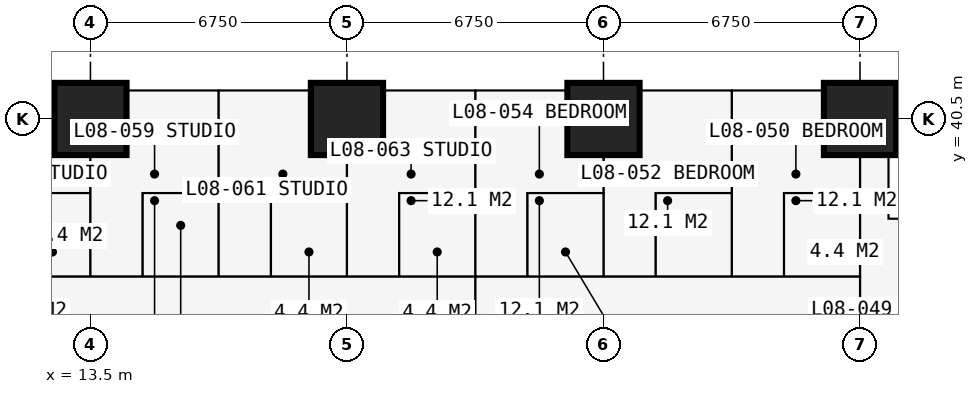
"""IFC4 building model, lengths in metres.
Left out: names, types, materials, properties, quantities, classifications, styles, units other than length and angle.
Written with IfcOpenShell. Run it as: python <this file> out.ifc"""

import sys

from ifc_helpers import new_model, si_unit, direction, frame, frame_2d, origin, origin_2d, place, context, subcontext, project, spatial, rectangle, extrude, element, fill, save


model = new_model("IFC4")
c1 = context("Model", 3, precision=1e-05, world=origin(), true_north=direction((0.0, 1.0)))
c2 = subcontext(c1, "Body", "Model", "MODEL_VIEW")
j1 = project(units=[si_unit("LENGTHUNIT", "METRE"), si_unit("PLANEANGLEUNIT", "RADIAN")], contexts=[c1])
p1 = place(None, origin())
s1 = spatial("IfcSite", under=j1, at=p1, CompositionType="ELEMENT")
p2 = place(p1, origin())
s2 = spatial("IfcBuilding", under=s1, at=p2, CompositionType="ELEMENT")
p3 = place(p2, frame((0.0, 0.0, 32.4)))
s3 = spatial("IfcBuildingStorey", under=s2, at=p3, CompositionType="ELEMENT", Elevation=32.4)
for number, where, z_axis, x_axis in (
    (1, (13.5, 40.5, 0.0), (0.0, 0.0, 1.0), (1.0, 0.0, 0.0)),
    (2, (20.25, 40.5, 0.0), (0.0, 0.0, 1.0), (1.0, 0.0, 0.0)),
    (3, (27.0, 40.5, 0.0), (0.0, 0.0, 1.0), (1.0, 0.0, 0.0)),
    (4, (33.75, 40.5, 0.0), (0.0, 0.0, 1.0), (1.0, 0.0, 0.0)),
):
    element("IfcColumn", number, at=place(p3, frame(where, z_axis=z_axis, x_axis=x_axis)), inside=s3, PredefinedType="COLUMN", context=c2, shape_type="SweptSolid", body=[
        extrude(rectangle(XDim=1.9, YDim=1.9, at=origin_2d()), origin(), (0.0, 0.0, 1.0), 3.6),
    ])
p4 = place(p3, frame((37.875, 37.875, 0.0), z_axis=(0.0, 0.0, 1.0), x_axis=(-1.0, 0.0, 0.0)))
e5 = element("IfcWall", 5, at=p4, inside=s3, PredefinedType="SOLIDWALL", context=c2, shape_type="SweptSolid", body=[
    extrude(rectangle(XDim=3.375, YDim=0.3, at=frame_2d((1.688, 0.0))), origin(), (0.0, 0.0, 1.0), 3.375),
])
p5 = place(p4, frame((0.788, 0.0, 0.6)))
e6 = element("IfcOpeningElement", 6, at=p5, cuts=e5, PredefinedType="OPENING", context=c2, shape_type="SweptSolid", body=[
    extrude(rectangle(XDim=1.8, YDim=2.1, at=frame_2d((0.9, 1.05))), frame((0.0, 0.16, 0.0), z_axis=(0.0, -1.0, 0.0), x_axis=(1.0, 0.0, 0.0)), (0.0, 0.0, 1.0), 0.32),
])
p6 = place(p3, frame((34.5, 37.875, 0.0), z_axis=(0.0, 0.0, 1.0), x_axis=(0.0, 1.0, 0.0)))
e7 = element("IfcWall", 7, at=p6, inside=s3, PredefinedType="SOLIDWALL", context=c2, shape_type="SweptSolid", body=[
    extrude(rectangle(XDim=3.375, YDim=0.3, at=frame_2d((1.688, 0.0))), origin(), (0.0, 0.0, 1.0), 3.375),
])
p7 = place(p6, frame((0.317, 0.0, 0.9)))
e8 = element("IfcOpeningElement", 8, at=p7, cuts=e7, PredefinedType="OPENING", context=c2, shape_type="SweptSolid", body=[
    extrude(rectangle(XDim=1.2, YDim=1.8, at=frame_2d((0.6, 0.9))), frame((0.0, 0.16, 0.0), z_axis=(0.0, -1.0, 0.0), x_axis=(1.0, 0.0, 0.0)), (0.0, 0.0, 1.0), 0.32),
])
p8 = place(p3, frame((13.5, 41.25, 0.0), z_axis=(0.0, 0.0, 1.0), x_axis=(1.0, 0.0, 0.0)))
e9 = element("IfcWall", 9, at=p8, inside=s3, PredefinedType="SOLIDWALL", context=c2, shape_type="SweptSolid", body=[
    extrude(rectangle(XDim=6.75, YDim=0.15, at=frame_2d((3.375, 0.0))), origin(), (0.0, 0.0, 1.0), 3.375),
])
p9 = place(p8, frame((0.996, 0.0, 0.0)))
e10 = element("IfcOpeningElement", 10, at=p9, cuts=e9, PredefinedType="OPENING", context=c2, shape_type="SweptSolid", body=[
    extrude(rectangle(XDim=1.0, YDim=2.2, at=frame_2d((0.5, 1.1))), frame((0.0, 0.085, 0.0), z_axis=(0.0, -1.0, 0.0), x_axis=(1.0, 0.0, 0.0)), (0.0, 0.0, 1.0), 0.17),
])
p10 = place(p8, frame((2.042, 0.0, 0.9)))
e11 = element("IfcOpeningElement", 11, at=p10, cuts=e9, PredefinedType="OPENING", context=c2, shape_type="SweptSolid", body=[
    extrude(rectangle(XDim=1.2, YDim=1.8, at=frame_2d((0.6, 0.9))), frame((0.0, 0.085, 0.0), z_axis=(0.0, -1.0, 0.0), x_axis=(1.0, 0.0, 0.0)), (0.0, 0.0, 1.0), 0.17),
])
p11 = place(p8, frame((4.754, 0.0, 0.0)))
e12 = element("IfcOpeningElement", 12, at=p11, cuts=e9, PredefinedType="OPENING", context=c2, shape_type="SweptSolid", body=[
    extrude(rectangle(XDim=1.0, YDim=2.2, at=frame_2d((0.5, 1.1))), frame((0.0, 0.085, 0.0), z_axis=(0.0, -1.0, 0.0), x_axis=(1.0, 0.0, 0.0)), (0.0, 0.0, 1.0), 0.17),
])
p12 = place(p8, frame((3.508, 0.0, 0.9)))
e13 = element("IfcOpeningElement", 13, at=p12, cuts=e9, PredefinedType="OPENING", context=c2, shape_type="SweptSolid", body=[
    extrude(rectangle(XDim=1.2, YDim=1.8, at=frame_2d((0.6, 0.9))), frame((0.0, 0.085, 0.0), z_axis=(0.0, -1.0, 0.0), x_axis=(1.0, 0.0, 0.0)), (0.0, 0.0, 1.0), 0.17),
])
p13 = place(p3, frame((16.875, 41.35, 0.0), z_axis=(0.0, 0.0, 1.0), x_axis=(0.0, 1.0, 0.0)))
e14 = element("IfcWall", 14, at=p13, inside=s3, PredefinedType="USERDEFINED", context=c2, shape_type="SweptSolid", body=[
    extrude(rectangle(XDim=2.2, YDim=1.0, at=frame_2d((1.1, 0.0))), origin(), (0.0, 0.0, 1.0), 0.9),
])
p14 = place(p3, frame((10.125, 36.35, 0.0), z_axis=(0.0, 0.0, 1.0), x_axis=(1.0, 0.0, 0.0)))
e15 = element("IfcWall", 15, at=p14, inside=s3, PredefinedType="PARTITIONING", context=c2, shape_type="SweptSolid", body=[
    extrude(rectangle(XDim=23.625, YDim=0.1, at=frame_2d((11.812, 0.0))), origin(), (0.0, 0.0, 1.0), 3.375),
])
p15 = place(p14, frame((20.5, 0.0, 0.0)))
e16 = element("IfcOpeningElement", 16, at=p15, cuts=e15, PredefinedType="OPENING", context=c2, shape_type="SweptSolid", body=[
    extrude(rectangle(XDim=0.95, YDim=2.2, at=frame_2d((0.475, 1.1))), frame((0.0, 0.06, 0.0), z_axis=(0.0, -1.0, 0.0), x_axis=(1.0, 0.0, 0.0)), (0.0, 0.0, 1.0), 0.12),
])
p16 = place(p14, frame((17.125, 0.0, 0.0)))
e17 = element("IfcOpeningElement", 17, at=p16, cuts=e15, PredefinedType="OPENING", context=c2, shape_type="SweptSolid", body=[
    extrude(rectangle(XDim=0.95, YDim=2.2, at=frame_2d((0.475, 1.1))), frame((0.0, 0.06, 0.0), z_axis=(0.0, -1.0, 0.0), x_axis=(1.0, 0.0, 0.0)), (0.0, 0.0, 1.0), 0.12),
])
p17 = place(p14, frame((13.7, 0.0, 0.0)))
e18 = element("IfcOpeningElement", 18, at=p17, cuts=e15, PredefinedType="OPENING", context=c2, shape_type="SweptSolid", body=[
    extrude(rectangle(XDim=0.95, YDim=2.2, at=frame_2d((0.475, 1.1))), frame((0.0, 0.06, 0.0), z_axis=(0.0, -1.0, 0.0), x_axis=(1.0, 0.0, 0.0)), (0.0, 0.0, 1.0), 0.12),
])
p18 = place(p14, frame((0.2, 0.0, 0.0)))
e19 = element("IfcOpeningElement", 19, at=p18, cuts=e15, PredefinedType="OPENING", context=c2, shape_type="SweptSolid", body=[
    extrude(rectangle(XDim=0.95, YDim=2.2, at=frame_2d((0.475, 1.1))), frame((0.0, 0.06, 0.0), z_axis=(0.0, -1.0, 0.0), x_axis=(1.0, 0.0, 0.0)), (0.0, 0.0, 1.0), 0.12),
])
p19 = place(p14, frame((3.625, 0.0, 0.0)))
e20 = element("IfcOpeningElement", 20, at=p19, cuts=e15, PredefinedType="OPENING", context=c2, shape_type="SweptSolid", body=[
    extrude(rectangle(XDim=0.95, YDim=2.2, at=frame_2d((0.475, 1.1))), frame((0.0, 0.06, 0.0), z_axis=(0.0, -1.0, 0.0), x_axis=(1.0, 0.0, 0.0)), (0.0, 0.0, 1.0), 0.12),
])
p20 = place(p14, frame((7.0, 0.0, 0.0)))
e21 = element("IfcOpeningElement", 21, at=p20, cuts=e15, PredefinedType="OPENING", context=c2, shape_type="SweptSolid", body=[
    extrude(rectangle(XDim=0.95, YDim=2.2, at=frame_2d((0.475, 1.1))), frame((0.0, 0.06, 0.0), z_axis=(0.0, -1.0, 0.0), x_axis=(1.0, 0.0, 0.0)), (0.0, 0.0, 1.0), 0.12),
])
p21 = place(p14, frame((10.375, 0.0, 0.0)))
e22 = element("IfcOpeningElement", 22, at=p21, cuts=e15, PredefinedType="OPENING", context=c2, shape_type="SweptSolid", body=[
    extrude(rectangle(XDim=0.95, YDim=2.2, at=frame_2d((0.475, 1.1))), frame((0.0, 0.06, 0.0), z_axis=(0.0, -1.0, 0.0), x_axis=(1.0, 0.0, 0.0)), (0.0, 0.0, 1.0), 0.12),
])
p22 = place(p3, frame((11.5, 38.55, 0.0), z_axis=(0.0, 0.0, 1.0), x_axis=(1.0, 0.0, 0.0)))
e23 = element("IfcWall", 23, at=p22, inside=s3, PredefinedType="PARTITIONING", context=c2, shape_type="SweptSolid", body=[
    extrude(rectangle(XDim=2.0, YDim=0.1, at=frame_2d((1.0, 0.0))), origin(), (0.0, 0.0, 1.0), 3.375),
])
p23 = place(p3, frame((13.5, 36.35, 0.0), z_axis=(0.0, 0.0, 1.0), x_axis=(0.0, 1.0, 0.0)))
e24 = element("IfcWall", 24, at=p23, inside=s3, PredefinedType="PARTITIONING", context=c2, shape_type="SweptSolid", body=[
    extrude(rectangle(XDim=4.884, YDim=0.175, at=frame_2d((2.442, 0.0))), origin(), (0.0, 0.0, 1.0), 2.877),
])
p24 = place(p3, frame((14.875, 36.35, 0.0), z_axis=(0.0, 0.0, 1.0), x_axis=(0.0, 1.0, 0.0)))
e25 = element("IfcWall", 25, at=p24, inside=s3, PredefinedType="PARTITIONING", context=c2, shape_type="SweptSolid", body=[
    extrude(rectangle(XDim=2.2, YDim=0.1, at=frame_2d((1.1, 0.0))), origin(), (0.0, 0.0, 1.0), 3.375),
])
p25 = place(p24, frame((0.65, 0.0, 0.0)))
e26 = element("IfcOpeningElement", 26, at=p25, cuts=e25, PredefinedType="OPENING", context=c2, shape_type="SweptSolid", body=[
    extrude(rectangle(XDim=0.9, YDim=2.2, at=frame_2d((0.45, 1.1))), frame((0.0, 0.06, 0.0), z_axis=(0.0, -1.0, 0.0), x_axis=(1.0, 0.0, 0.0)), (0.0, 0.0, 1.0), 0.12),
])
p26 = place(p3, frame((14.875, 38.55, 0.0), z_axis=(0.0, 0.0, 1.0), x_axis=(1.0, 0.0, 0.0)))
e27 = element("IfcWall", 27, at=p26, inside=s3, PredefinedType="PARTITIONING", context=c2, shape_type="SweptSolid", body=[
    extrude(rectangle(XDim=2.0, YDim=0.1, at=frame_2d((1.0, 0.0))), origin(), (0.0, 0.0, 1.0), 3.375),
])
p27 = place(p3, frame((16.875, 36.35, 0.0), z_axis=(0.0, 0.0, 1.0), x_axis=(0.0, 1.0, 0.0)))
e28 = element("IfcWall", 28, at=p27, inside=s3, PredefinedType="PARTITIONING", context=c2, shape_type="SweptSolid", body=[
    extrude(rectangle(XDim=4.884, YDim=0.175, at=frame_2d((2.442, 0.0))), origin(), (0.0, 0.0, 1.0), 3.375),
])
p28 = place(p3, frame((18.25, 36.35, 0.0), z_axis=(0.0, 0.0, 1.0), x_axis=(0.0, 1.0, 0.0)))
e29 = element("IfcWall", 29, at=p28, inside=s3, PredefinedType="PARTITIONING", context=c2, shape_type="SweptSolid", body=[
    extrude(rectangle(XDim=2.2, YDim=0.1, at=frame_2d((1.1, 0.0))), origin(), (0.0, 0.0, 1.0), 3.375),
])
p29 = place(p28, frame((0.65, 0.0, 0.0)))
e30 = element("IfcOpeningElement", 30, at=p29, cuts=e29, PredefinedType="OPENING", context=c2, shape_type="SweptSolid", body=[
    extrude(rectangle(XDim=0.9, YDim=2.2, at=frame_2d((0.45, 1.1))), frame((0.0, 0.06, 0.0), z_axis=(0.0, -1.0, 0.0), x_axis=(1.0, 0.0, 0.0)), (0.0, 0.0, 1.0), 0.12),
])
p30 = place(p3, frame((18.25, 38.55, 0.0), z_axis=(0.0, 0.0, 1.0), x_axis=(1.0, 0.0, 0.0)))
e31 = element("IfcWall", 31, at=p30, inside=s3, PredefinedType="PARTITIONING", context=c2, shape_type="SweptSolid", body=[
    extrude(rectangle(XDim=2.0, YDim=0.1, at=frame_2d((1.0, 0.0))), origin(), (0.0, 0.0, 1.0), 3.375),
])
p31 = place(p3, frame((20.25, 36.35, 0.0), z_axis=(0.0, 0.0, 1.0), x_axis=(0.0, 1.0, 0.0)))
e32 = element("IfcWall", 32, at=p31, inside=s3, PredefinedType="PARTITIONING", context=c2, shape_type="SweptSolid", body=[
    extrude(rectangle(XDim=4.884, YDim=0.175, at=frame_2d((2.442, 0.0))), origin(), (0.0, 0.0, 1.0), 2.61),
])
p32 = place(p3, frame((21.625, 36.35, 0.0), z_axis=(0.0, 0.0, 1.0), x_axis=(0.0, 1.0, 0.0)))
e33 = element("IfcWall", 33, at=p32, inside=s3, PredefinedType="PARTITIONING", context=c2, shape_type="SweptSolid", body=[
    extrude(rectangle(XDim=2.2, YDim=0.1, at=frame_2d((1.1, 0.0))), origin(), (0.0, 0.0, 1.0), 3.375),
])
p33 = place(p32, frame((0.65, 0.0, 0.0)))
e34 = element("IfcOpeningElement", 34, at=p33, cuts=e33, PredefinedType="OPENING", context=c2, shape_type="SweptSolid", body=[
    extrude(rectangle(XDim=0.9, YDim=2.2, at=frame_2d((0.45, 1.1))), frame((0.0, 0.06, 0.0), z_axis=(0.0, -1.0, 0.0), x_axis=(1.0, 0.0, 0.0)), (0.0, 0.0, 1.0), 0.12),
])
p34 = place(p3, frame((21.625, 38.55, 0.0), z_axis=(0.0, 0.0, 1.0), x_axis=(1.0, 0.0, 0.0)))
e35 = element("IfcWall", 35, at=p34, inside=s3, PredefinedType="PARTITIONING", context=c2, shape_type="SweptSolid", body=[
    extrude(rectangle(XDim=2.0, YDim=0.1, at=frame_2d((1.0, 0.0))), origin(), (0.0, 0.0, 1.0), 3.375),
])
p35 = place(p3, frame((23.625, 29.2, 0.0), z_axis=(0.0, 0.0, 1.0), x_axis=(0.0, 1.0, 0.0)))
e36 = element("IfcWall", 36, at=p35, inside=s3, PredefinedType="PARTITIONING", context=c2, shape_type="SweptSolid", body=[
    extrude(rectangle(XDim=12.034, YDim=0.15, at=frame_2d((6.017, 0.0))), origin(), (0.0, 0.0, 1.0), 3.375),
])
p36 = place(p3, frame((25.0, 36.35, 0.0), z_axis=(0.0, 0.0, 1.0), x_axis=(0.0, 1.0, 0.0)))
e37 = element("IfcWall", 37, at=p36, inside=s3, PredefinedType="PARTITIONING", context=c2, shape_type="SweptSolid", body=[
    extrude(rectangle(XDim=2.2, YDim=0.1, at=frame_2d((1.1, 0.0))), origin(), (0.0, 0.0, 1.0), 3.375),
])
p37 = place(p3, frame((25.0, 38.55, 0.0), z_axis=(0.0, 0.0, 1.0), x_axis=(1.0, 0.0, 0.0)))
e38 = element("IfcWall", 38, at=p37, inside=s3, PredefinedType="PARTITIONING", context=c2, shape_type="SweptSolid", body=[
    extrude(rectangle(XDim=2.0, YDim=0.1, at=frame_2d((1.0, 0.0))), origin(), (0.0, 0.0, 1.0), 3.375),
])
p38 = place(p3, frame((27.0, 36.35, 0.0), z_axis=(0.0, 0.0, 1.0), x_axis=(0.0, 1.0, 0.0)))
e39 = element("IfcWall", 39, at=p38, inside=s3, PredefinedType="PARTITIONING", context=c2, shape_type="SweptSolid", body=[
    extrude(rectangle(XDim=4.884, YDim=0.175, at=frame_2d((2.442, 0.0))), origin(), (0.0, 0.0, 1.0), 2.61),
])
p39 = place(p38, frame((0.65, 0.0, 0.0)))
e40 = element("IfcOpeningElement", 40, at=p39, cuts=e39, PredefinedType="OPENING", context=c2, shape_type="SweptSolid", body=[
    extrude(rectangle(XDim=0.9, YDim=2.2, at=frame_2d((0.45, 1.1))), frame((0.0, 0.097, 0.0), z_axis=(0.0, -1.0, 0.0), x_axis=(1.0, 0.0, 0.0)), (0.0, 0.0, 1.0), 0.195),
])
p40 = place(p3, frame((28.375, 36.35, 0.0), z_axis=(0.0, 0.0, 1.0), x_axis=(0.0, 1.0, 0.0)))
e41 = element("IfcWall", 41, at=p40, inside=s3, PredefinedType="PARTITIONING", context=c2, shape_type="SweptSolid", body=[
    extrude(rectangle(XDim=2.2, YDim=0.1, at=frame_2d((1.1, 0.0))), origin(), (0.0, 0.0, 1.0), 3.375),
])
p41 = place(p3, frame((28.375, 38.55, 0.0), z_axis=(0.0, 0.0, 1.0), x_axis=(1.0, 0.0, 0.0)))
e42 = element("IfcWall", 42, at=p41, inside=s3, PredefinedType="PARTITIONING", context=c2, shape_type="SweptSolid", body=[
    extrude(rectangle(XDim=2.0, YDim=0.1, at=frame_2d((1.0, 0.0))), origin(), (0.0, 0.0, 1.0), 3.375),
])
p42 = place(p3, frame((30.375, 36.35, 0.0), z_axis=(0.0, 0.0, 1.0), x_axis=(0.0, 1.0, 0.0)))
e43 = element("IfcWall", 43, at=p42, inside=s3, PredefinedType="PARTITIONING", context=c2, shape_type="SweptSolid", body=[
    extrude(rectangle(XDim=4.884, YDim=0.175, at=frame_2d((2.442, 0.0))), origin(), (0.0, 0.0, 1.0), 3.375),
])
p43 = place(p42, frame((0.65, 0.0, 0.0)))
e44 = element("IfcOpeningElement", 44, at=p43, cuts=e43, PredefinedType="OPENING", context=c2, shape_type="SweptSolid", body=[
    extrude(rectangle(XDim=0.9, YDim=2.2, at=frame_2d((0.45, 1.1))), frame((0.0, 0.097, 0.0), z_axis=(0.0, -1.0, 0.0), x_axis=(1.0, 0.0, 0.0)), (0.0, 0.0, 1.0), 0.195),
])
p44 = place(p3, frame((31.75, 36.35, 0.0), z_axis=(0.0, 0.0, 1.0), x_axis=(0.0, 1.0, 0.0)))
e45 = element("IfcWall", 45, at=p44, inside=s3, PredefinedType="PARTITIONING", context=c2, shape_type="SweptSolid", body=[
    extrude(rectangle(XDim=2.2, YDim=0.1, at=frame_2d((1.1, 0.0))), origin(), (0.0, 0.0, 1.0), 3.375),
])
p45 = place(p44, frame((0.65, 0.0, 0.0)))
e46 = element("IfcOpeningElement", 46, at=p45, cuts=e45, PredefinedType="OPENING", context=c2, shape_type="SweptSolid", body=[
    extrude(rectangle(XDim=0.9, YDim=2.2, at=frame_2d((0.45, 1.1))), frame((0.0, 0.06, 0.0), z_axis=(0.0, -1.0, 0.0), x_axis=(1.0, 0.0, 0.0)), (0.0, 0.0, 1.0), 0.12),
])
p46 = place(p3, frame((31.75, 38.55, 0.0), z_axis=(0.0, 0.0, 1.0), x_axis=(1.0, 0.0, 0.0)))
e47 = element("IfcWall", 47, at=p46, inside=s3, PredefinedType="PARTITIONING", context=c2, shape_type="SweptSolid", body=[
    extrude(rectangle(XDim=2.0, YDim=0.1, at=frame_2d((1.0, 0.0))), origin(), (0.0, 0.0, 1.0), 3.375),
])
p47 = place(p3, frame((33.75, 30.375, 0.0), z_axis=(0.0, 0.0, 1.0), x_axis=(0.0, 1.0, 0.0)))
e48 = element("IfcWall", 48, at=p47, inside=s3, PredefinedType="PARTITIONING", context=c2, shape_type="SweptSolid", body=[
    extrude(rectangle(XDim=10.859, YDim=0.15, at=frame_2d((5.429, 0.0))), origin(), (0.0, 0.0, 1.0), 2.877),
])
p48 = place(p47, frame((1.4, 0.0, 0.0)))
e49 = element("IfcOpeningElement", 49, at=p48, cuts=e48, PredefinedType="OPENING", context=c2, shape_type="SweptSolid", body=[
    extrude(rectangle(XDim=1.0, YDim=2.2, at=frame_2d((0.5, 1.1))), frame((0.0, 0.085, 0.0), z_axis=(0.0, -1.0, 0.0), x_axis=(1.0, 0.0, 0.0)), (0.0, 0.0, 1.0), 0.17),
])
p49 = place(p7, origin())
e50 = element("IfcWindow", 50, at=p49, inside=s3, PartitioningType="SINGLE_PANEL", PredefinedType="WINDOW", context=c2, shape_type="SweptSolid", body=[
    extrude(rectangle(XDim=1.2, YDim=1.8, at=frame_2d((0.6, 0.9))), frame((0.0, 0.03, 0.0), z_axis=(0.0, -1.0, 0.0), x_axis=(1.0, 0.0, 0.0)), (0.0, 0.0, 1.0), 0.06),
])
fill(e8, e50)
p50 = place(p9, origin())
e51 = element("IfcDoor", 51, at=p50, inside=s3, OperationType="SINGLE_SWING_LEFT", PredefinedType="DOOR", context=c2, shape_type="SweptSolid", body=[
    extrude(rectangle(XDim=1.0, YDim=2.2, at=frame_2d((0.5, 1.1))), frame((0.0, 0.025, 0.0), z_axis=(0.0, -1.0, 0.0), x_axis=(1.0, 0.0, 0.0)), (0.0, 0.0, 1.0), 0.05),
])
fill(e10, e51)
p51 = place(p10, origin())
e52 = element("IfcWindow", 52, at=p51, inside=s3, PartitioningType="SINGLE_PANEL", PredefinedType="WINDOW", context=c2, shape_type="SweptSolid", body=[
    extrude(rectangle(XDim=1.2, YDim=1.8, at=frame_2d((0.6, 0.9))), frame((0.0, 0.03, 0.0), z_axis=(0.0, -1.0, 0.0), x_axis=(1.0, 0.0, 0.0)), (0.0, 0.0, 1.0), 0.06),
])
fill(e11, e52)
p52 = place(p11, origin())
e53 = element("IfcDoor", 53, at=p52, inside=s3, OperationType="SINGLE_SWING_RIGHT", PredefinedType="DOOR", context=c2, shape_type="SweptSolid", body=[
    extrude(rectangle(XDim=1.0, YDim=2.2, at=frame_2d((0.5, 1.1))), frame((0.0, 0.025, 0.0), z_axis=(0.0, -1.0, 0.0), x_axis=(1.0, 0.0, 0.0)), (0.0, 0.0, 1.0), 0.05),
])
fill(e12, e53)
p53 = place(p12, origin())
e54 = element("IfcWindow", 54, at=p53, inside=s3, PartitioningType="SINGLE_PANEL", PredefinedType="WINDOW", context=c2, shape_type="SweptSolid", body=[
    extrude(rectangle(XDim=1.2, YDim=1.8, at=frame_2d((0.6, 0.9))), frame((0.0, 0.03, 0.0), z_axis=(0.0, -1.0, 0.0), x_axis=(1.0, 0.0, 0.0)), (0.0, 0.0, 1.0), 0.06),
])
fill(e13, e54)
p54 = place(p15, origin())
e55 = element("IfcDoor", 55, at=p54, inside=s3, OperationType="SINGLE_SWING_LEFT", PredefinedType="DOOR", context=c2, shape_type="SweptSolid", body=[
    extrude(rectangle(XDim=0.95, YDim=2.2, at=frame_2d((0.475, 1.1))), frame((0.0, 0.025, 0.0), z_axis=(0.0, -1.0, 0.0), x_axis=(1.0, 0.0, 0.0)), (0.0, 0.0, 1.0), 0.05),
])
fill(e16, e55)
p55 = place(p45, origin())
e56 = element("IfcDoor", 56, at=p55, inside=s3, OperationType="SINGLE_SWING_RIGHT", PredefinedType="DOOR", context=c2, shape_type="SweptSolid", body=[
    extrude(rectangle(XDim=0.9, YDim=2.2, at=frame_2d((0.45, 1.1))), frame((0.0, 0.025, 0.0), z_axis=(0.0, -1.0, 0.0), x_axis=(1.0, 0.0, 0.0)), (0.0, 0.0, 1.0), 0.05),
])
fill(e46, e56)
p56 = place(p16, origin())
e57 = element("IfcDoor", 57, at=p56, inside=s3, OperationType="SINGLE_SWING_LEFT", PredefinedType="DOOR", context=c2, shape_type="SweptSolid", body=[
    extrude(rectangle(XDim=0.95, YDim=2.2, at=frame_2d((0.475, 1.1))), frame((0.0, 0.025, 0.0), z_axis=(0.0, -1.0, 0.0), x_axis=(1.0, 0.0, 0.0)), (0.0, 0.0, 1.0), 0.05),
])
fill(e17, e57)
p57 = place(p43, origin())
e58 = element("IfcDoor", 58, at=p57, inside=s3, OperationType="SINGLE_SWING_RIGHT", PredefinedType="DOOR", context=c2, shape_type="SweptSolid", body=[
    extrude(rectangle(XDim=0.9, YDim=2.2, at=frame_2d((0.45, 1.1))), frame((0.0, 0.025, 0.0), z_axis=(0.0, -1.0, 0.0), x_axis=(1.0, 0.0, 0.0)), (0.0, 0.0, 1.0), 0.05),
])
fill(e44, e58)
p58 = place(p17, origin())
e59 = element("IfcDoor", 59, at=p58, inside=s3, OperationType="SINGLE_SWING_LEFT", PredefinedType="DOOR", context=c2, shape_type="SweptSolid", body=[
    extrude(rectangle(XDim=0.95, YDim=2.2, at=frame_2d((0.475, 1.1))), frame((0.0, 0.025, 0.0), z_axis=(0.0, -1.0, 0.0), x_axis=(1.0, 0.0, 0.0)), (0.0, 0.0, 1.0), 0.05),
])
fill(e18, e59)
p59 = place(p39, origin())
e60 = element("IfcDoor", 60, at=p59, inside=s3, OperationType="SINGLE_SWING_RIGHT", PredefinedType="DOOR", context=c2, shape_type="SweptSolid", body=[
    extrude(rectangle(XDim=0.9, YDim=2.2, at=frame_2d((0.45, 1.1))), frame((0.0, 0.025, 0.0), z_axis=(0.0, -1.0, 0.0), x_axis=(1.0, 0.0, 0.0)), (0.0, 0.0, 1.0), 0.05),
])
fill(e40, e60)
p60 = place(p19, origin())
e61 = element("IfcDoor", 61, at=p60, inside=s3, OperationType="SINGLE_SWING_LEFT", PredefinedType="DOOR", context=c2, shape_type="SweptSolid", body=[
    extrude(rectangle(XDim=0.95, YDim=2.2, at=frame_2d((0.475, 1.1))), frame((0.0, 0.025, 0.0), z_axis=(0.0, -1.0, 0.0), x_axis=(1.0, 0.0, 0.0)), (0.0, 0.0, 1.0), 0.05),
])
fill(e20, e61)
p61 = place(p25, origin())
e62 = element("IfcDoor", 62, at=p61, inside=s3, OperationType="SINGLE_SWING_RIGHT", PredefinedType="DOOR", context=c2, shape_type="SweptSolid", body=[
    extrude(rectangle(XDim=0.9, YDim=2.2, at=frame_2d((0.45, 1.1))), frame((0.0, 0.025, 0.0), z_axis=(0.0, -1.0, 0.0), x_axis=(1.0, 0.0, 0.0)), (0.0, 0.0, 1.0), 0.05),
])
fill(e26, e62)
p62 = place(p20, origin())
e63 = element("IfcDoor", 63, at=p62, inside=s3, OperationType="SINGLE_SWING_LEFT", PredefinedType="DOOR", context=c2, shape_type="SweptSolid", body=[
    extrude(rectangle(XDim=0.95, YDim=2.2, at=frame_2d((0.475, 1.1))), frame((0.0, 0.025, 0.0), z_axis=(0.0, -1.0, 0.0), x_axis=(1.0, 0.0, 0.0)), (0.0, 0.0, 1.0), 0.05),
])
fill(e21, e63)
p63 = place(p29, origin())
e64 = element("IfcDoor", 64, at=p63, inside=s3, OperationType="SINGLE_SWING_RIGHT", PredefinedType="DOOR", context=c2, shape_type="SweptSolid", body=[
    extrude(rectangle(XDim=0.9, YDim=2.2, at=frame_2d((0.45, 1.1))), frame((0.0, 0.025, 0.0), z_axis=(0.0, -1.0, 0.0), x_axis=(1.0, 0.0, 0.0)), (0.0, 0.0, 1.0), 0.05),
])
fill(e30, e64)
p64 = place(p21, origin())
e65 = element("IfcDoor", 65, at=p64, inside=s3, OperationType="SINGLE_SWING_LEFT", PredefinedType="DOOR", context=c2, shape_type="SweptSolid", body=[
    extrude(rectangle(XDim=0.95, YDim=2.2, at=frame_2d((0.475, 1.1))), frame((0.0, 0.025, 0.0), z_axis=(0.0, -1.0, 0.0), x_axis=(1.0, 0.0, 0.0)), (0.0, 0.0, 1.0), 0.05),
])
fill(e22, e65)
p65 = place(p33, origin())
e66 = element("IfcDoor", 66, at=p65, inside=s3, OperationType="SINGLE_SWING_RIGHT", PredefinedType="DOOR", context=c2, shape_type="SweptSolid", body=[
    extrude(rectangle(XDim=0.9, YDim=2.2, at=frame_2d((0.45, 1.1))), frame((0.0, 0.025, 0.0), z_axis=(0.0, -1.0, 0.0), x_axis=(1.0, 0.0, 0.0)), (0.0, 0.0, 1.0), 0.05),
])
fill(e34, e66)
save(model, sys.argv[1])
